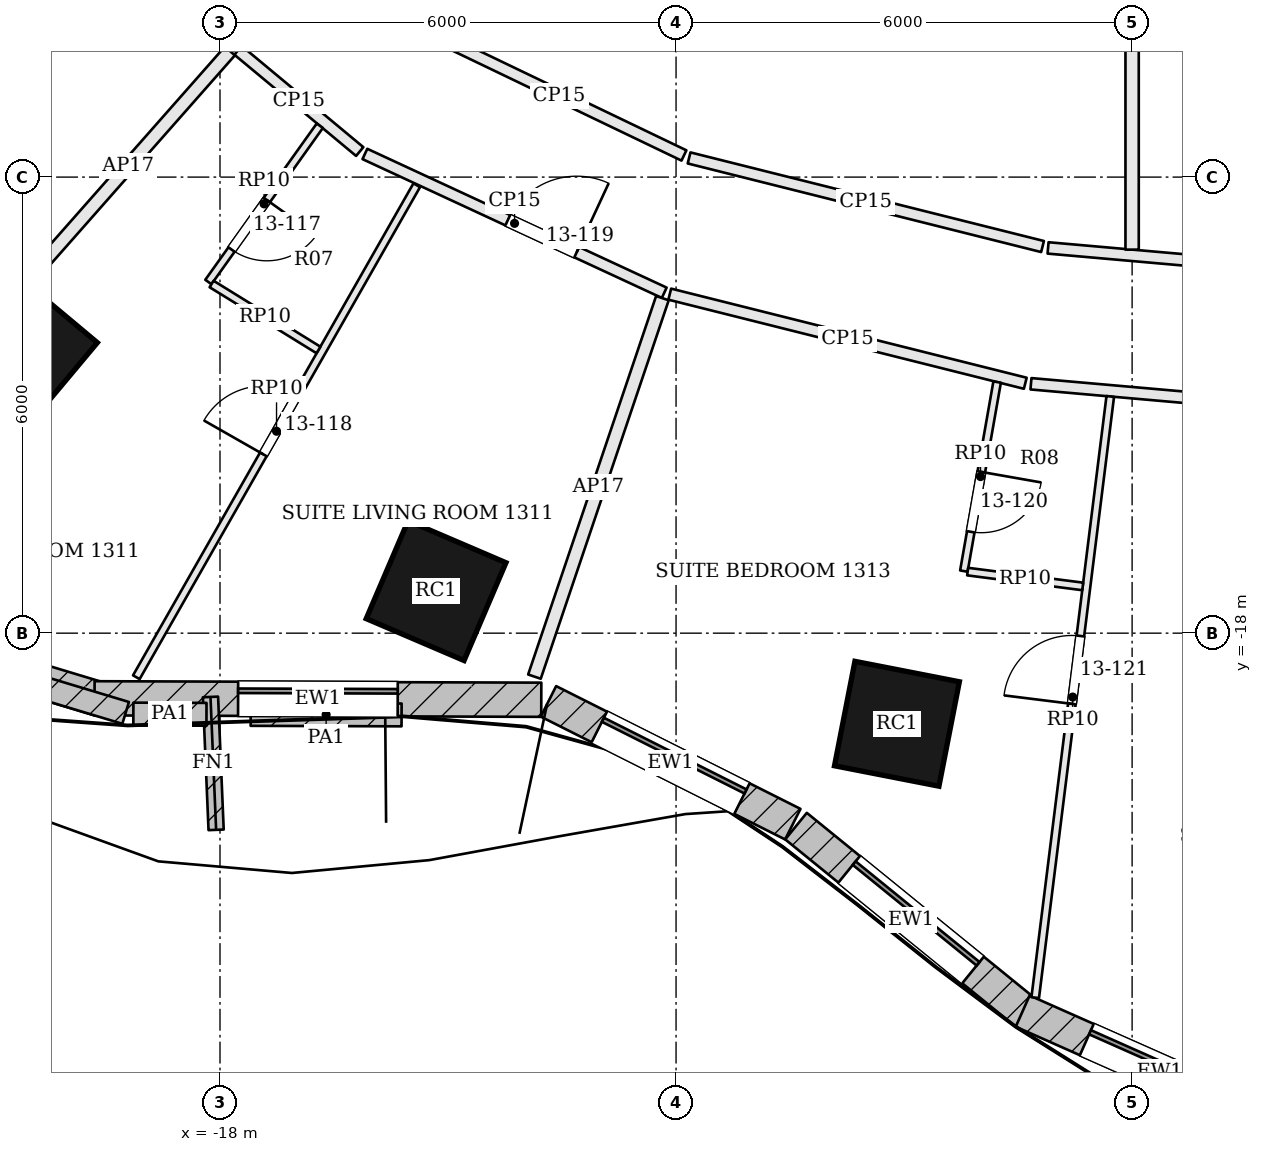
"""IFC4 building model, lengths in metres.
Left out: names, types, materials, properties, quantities, classifications, styles, units other than length and angle.
Written with IfcOpenShell. Run it as: python <this file> out.ifc"""

import sys

from ifc_helpers import new_model, si_unit, direction, frame, frame_2d, origin, origin_2d, place, context, subcontext, project, spatial, rectangle, extrude, element, fill, save


model = new_model("IFC4")
c1 = context("Model", 3, precision=1e-05, world=origin(), true_north=direction((0.0, 1.0)))
c2 = subcontext(c1, "Body", "Model", "MODEL_VIEW")
j1 = project(units=[si_unit("LENGTHUNIT", "METRE"), si_unit("PLANEANGLEUNIT", "RADIAN")], contexts=[c1])
p1 = place(None, origin())
s1 = spatial("IfcSite", under=j1, at=p1, CompositionType="ELEMENT")
p2 = place(p1, origin())
s2 = spatial("IfcBuilding", under=s1, at=p2, CompositionType="ELEMENT")
p3 = place(p2, frame((0.0, 0.0, 62.7)))
s3 = spatial("IfcBuildingStorey", under=s2, at=p3, CompositionType="ELEMENT", Elevation=62.7)
for number, where, z_axis, x_axis in (
    (1, (-20.6, -14.266, 0.0), (0.0, 0.0, 1.0), (0.767, -0.641, 0.0)),
    (2, (-15.157, -17.441, 0.0), (0.0, 0.0, 1.0), (0.919, -0.394, 0.0)),
    (3, (-9.094, -19.192, 0.0), (0.0, 0.0, 1.0), (0.981, -0.192, 0.0)),
):
    element("IfcColumn", number, at=place(p3, frame(where, z_axis=z_axis, x_axis=x_axis)), inside=s3, PredefinedType="COLUMN", context=c2, shape_type="SweptSolid", body=[
        extrude(rectangle(XDim=1.4, YDim=1.4, at=origin_2d()), origin(), (0.0, 0.0, 1.0), 3.6),
    ])
p4 = place(p3, frame((-24.257, -17.456, 0.0), z_axis=(0.0, 0.0, 1.0), x_axis=(0.957268138294, -0.289201852359, 0.0)))
e4 = element("IfcWall", 4, at=p4, inside=s3, PredefinedType="SOLIDWALL", context=c2, shape_type="SweptSolid", body=[
    extrude(rectangle(XDim=4.879, YDim=0.45, at=frame_2d((2.44, 0.0))), origin(), (0.0, 0.0, 1.0), 3.4),
])
p5 = place(p4, frame((1.39, 0.0, 0.9)))
e5 = element("IfcOpeningElement", 5, at=p5, cuts=e4, PredefinedType="OPENING", context=c2, shape_type="SweptSolid", body=[
    extrude(rectangle(XDim=2.1, YDim=2.0, at=frame_2d((1.05, 1.0))), frame((0.0, 0.235, 0.0), z_axis=(0.0, -1.0, 0.0), x_axis=(1.0, 0.0, 0.0)), (0.0, 0.0, 1.0), 0.47),
])
p6 = place(p3, frame((-19.65, -18.857, 0.0), z_axis=(0.0, 0.0, 1.0), x_axis=(0.999994750773, -0.003240127552, 0.0)))
e6 = element("IfcWall", 6, at=p6, inside=s3, PredefinedType="SOLIDWALL", context=c2, shape_type="SweptSolid", body=[
    extrude(rectangle(XDim=5.877, YDim=0.45, at=frame_2d((2.938, 0.0))), origin(), (0.0, 0.0, 1.0), 3.4),
])
p7 = place(p6, frame((1.889, 0.0, 0.9)))
e7 = element("IfcOpeningElement", 7, at=p7, cuts=e6, PredefinedType="OPENING", context=c2, shape_type="SweptSolid", body=[
    extrude(rectangle(XDim=2.1, YDim=2.0, at=frame_2d((1.05, 1.0))), frame((0.0, 0.235, 0.0), z_axis=(0.0, -1.0, 0.0), x_axis=(1.0, 0.0, 0.0)), (0.0, 0.0, 1.0), 0.47),
])
p8 = place(p3, frame((-13.679, -18.897, 0.0), z_axis=(0.0, 0.0, 1.0), x_axis=(0.893502471356, -0.449058274259, 0.0)))
e8 = element("IfcWall", 8, at=p8, inside=s3, PredefinedType="SOLIDWALL", context=c2, shape_type="SweptSolid", body=[
    extrude(rectangle(XDim=3.598, YDim=0.45, at=frame_2d((1.799, 0.0))), origin(), (0.0, 0.0, 1.0), 3.4),
])
p9 = place(p8, frame((0.749, 0.0, 0.9)))
e9 = element("IfcOpeningElement", 9, at=p9, cuts=e8, PredefinedType="OPENING", context=c2, shape_type="SweptSolid", body=[
    extrude(rectangle(XDim=2.1, YDim=2.0, at=frame_2d((1.05, 1.0))), frame((0.0, 0.235, 0.0), z_axis=(0.0, -1.0, 0.0), x_axis=(1.0, 0.0, 0.0)), (0.0, 0.0, 1.0), 0.47),
])
p10 = place(p3, frame((-10.422, -20.539, 0.0), z_axis=(0.0, 0.0, 1.0), x_axis=(0.775999170522, -0.63073392754, 0.0)))
e10 = element("IfcWall", 10, at=p10, inside=s3, PredefinedType="SOLIDWALL", context=c2, shape_type="SweptSolid", body=[
    extrude(rectangle(XDim=3.903, YDim=0.45, at=frame_2d((1.951, 0.0))), origin(), (0.0, 0.0, 1.0), 3.4),
])
p11 = place(p10, frame((0.901, 0.0, 0.9)))
e11 = element("IfcOpeningElement", 11, at=p11, cuts=e10, PredefinedType="OPENING", context=c2, shape_type="SweptSolid", body=[
    extrude(rectangle(XDim=2.1, YDim=2.0, at=frame_2d((1.05, 1.0))), frame((0.0, 0.235, 0.0), z_axis=(0.0, -1.0, 0.0), x_axis=(1.0, 0.0, 0.0)), (0.0, 0.0, 1.0), 0.47),
])
p12 = place(p3, frame((-7.44, -22.972, 0.0), z_axis=(0.0, 0.0, 1.0), x_axis=(0.914114918534, -0.405455195692, 0.0)))
e12 = element("IfcWall", 12, at=p12, inside=s3, PredefinedType="SOLIDWALL", context=c2, shape_type="SweptSolid", body=[
    extrude(rectangle(XDim=3.946, YDim=0.45, at=frame_2d((1.973, 0.0))), origin(), (0.0, 0.0, 1.0), 3.4),
])
p13 = place(p12, frame((0.923, 0.0, 0.9)))
e13 = element("IfcOpeningElement", 13, at=p13, cuts=e12, PredefinedType="OPENING", context=c2, shape_type="SweptSolid", body=[
    extrude(rectangle(XDim=2.1, YDim=2.0, at=frame_2d((1.05, 1.0))), frame((0.0, 0.235, 0.0), z_axis=(0.0, -1.0, 0.0), x_axis=(1.0, 0.0, 0.0)), (0.0, 0.0, 1.0), 0.47),
])
p14 = place(p3, frame((-18.125, -18.839, 0.0), z_axis=(0.0, 0.0, 1.0), x_axis=(0.042274699855, -0.999106025281, 0.0)))
e14 = element("IfcWall", 14, at=p14, inside=s3, PredefinedType="SOLIDWALL", context=c2, shape_type="SweptSolid", body=[
    extrude(rectangle(XDim=1.75, YDim=0.2, at=frame_2d((0.875, 0.0))), origin(), (0.0, 0.0, 1.0), 3.4),
])
p15 = place(p3, frame((-24.128, -17.573, 3.6), z_axis=(0.0, 0.0, 1.0), x_axis=(0.95727702005, -0.289172451806, 0.0)))
e15 = element("IfcWall", 15, at=p15, inside=s3, PredefinedType="PARAPET", context=c2, shape_type="SweptSolid", body=[
    extrude(rectangle(XDim=5.105, YDim=0.3, at=frame_2d((2.553, 0.0))), origin(), (0.0, 0.0, 1.0), 1.1),
])
p16 = place(p3, frame((-19.14, -19.064, 3.6), z_axis=(0.0, 0.0, 1.0), x_axis=(0.999994556719, -0.003299474426, 0.0)))
e16 = element("IfcWall", 16, at=p16, inside=s3, PredefinedType="PARAPET", context=c2, shape_type="SweptSolid", body=[
    extrude(rectangle(XDim=0.962, YDim=0.3, at=frame_2d((0.481, 0.0))), origin(), (0.0, 0.0, 1.0), 1.1),
])
p17 = place(p3, frame((-17.596, -19.069, 3.6), z_axis=(0.0, 0.0, 1.0), x_axis=(0.999994488127, -0.003320198128, 0.0)))
e17 = element("IfcWall", 17, at=p17, inside=s3, PredefinedType="PARAPET", context=c2, shape_type="SweptSolid", body=[
    extrude(rectangle(XDim=1.985, YDim=0.3, at=frame_2d((0.993, 0.0))), origin(), (0.0, 0.0, 1.0), 1.1),
])
p18 = place(p3, frame((-20.545, -13.373, 0.0), z_axis=(0.0, 0.0, 1.0), x_axis=(0.66156772741, 0.74988541928, 0.0)))
e18 = element("IfcWall", 18, at=p18, inside=s3, PredefinedType="PARTITIONING", context=c2, shape_type="SweptSolid", body=[
    extrude(rectangle(XDim=4.044, YDim=0.175, at=frame_2d((2.022, 0.0))), origin(), (0.0, 0.0, 1.0), 2.68),
])
p19 = place(p3, frame((-17.762, -10.333, 0.0), z_axis=(0.0, 0.0, 1.0), x_axis=(0.768864852283, -0.639411322174, 0.0)))
e19 = element("IfcWall", 19, at=p19, inside=s3, PredefinedType="PARTITIONING", context=c2, shape_type="SweptSolid", body=[
    extrude(rectangle(XDim=2.082, YDim=0.15, at=frame_2d((1.041, 0.0))), origin(), (0.0, 0.0, 1.0), 2.68),
])
p20 = place(p3, frame((-16.094, -11.696, 0.0), z_axis=(0.0, 0.0, 1.0), x_axis=(0.907210631987, -0.420676680135, 0.0)))
e20 = element("IfcWall", 20, at=p20, inside=s3, PredefinedType="PARTITIONING", context=c2, shape_type="SweptSolid", body=[
    extrude(rectangle(XDim=4.341, YDim=0.15, at=frame_2d((2.17, 0.0))), origin(), (0.0, 0.0, 1.0), 2.68),
])
p21 = place(p20, frame((2.072, 0.0, 0.0)))
e21 = element("IfcOpeningElement", 21, at=p21, cuts=e20, PredefinedType="OPENING", context=c2, shape_type="SweptSolid", body=[
    extrude(rectangle(XDim=1.0, YDim=2.1, at=frame_2d((0.5, 1.05))), frame((0.0, 0.085, 0.0), z_axis=(0.0, -1.0, 0.0), x_axis=(1.0, 0.0, 0.0)), (0.0, 0.0, 1.0), 0.17),
])
p22 = place(p3, frame((-13.863, -18.572, 0.0), z_axis=(0.0, 0.0, 1.0), x_axis=(0.32028005449, 0.947322905189, 0.0)))
e22 = element("IfcWall", 22, at=p22, inside=s3, PredefinedType="PARTITIONING", context=c2, shape_type="SweptSolid", body=[
    extrude(rectangle(XDim=5.256, YDim=0.175, at=frame_2d((2.628, 0.0))), origin(), (0.0, 0.0, 1.0), 2.68),
])
p23 = place(p3, frame((-12.083, -13.54, 0.0), z_axis=(0.0, 0.0, 1.0), x_axis=(0.969981460173, -0.243178878443, 0.0)))
e23 = element("IfcWall", 23, at=p23, inside=s3, PredefinedType="PARTITIONING", context=c2, shape_type="SweptSolid", body=[
    extrude(rectangle(XDim=4.822, YDim=0.15, at=frame_2d((2.411, 0.0))), origin(), (0.0, 0.0, 1.0), 2.68),
])
p24 = place(p3, frame((-7.331, -14.719, 0.0), z_axis=(0.0, 0.0, 1.0), x_axis=(0.996139466017, -0.087784760882, 0.0)))
e24 = element("IfcWall", 24, at=p24, inside=s3, PredefinedType="PARTITIONING", context=c2, shape_type="SweptSolid", body=[
    extrude(rectangle(XDim=5.162, YDim=0.15, at=frame_2d((2.581, 0.0))), origin(), (0.0, 0.0, 1.0), 2.68),
])
p25 = place(p24, frame((3.622, 0.0, 0.0)))
e25 = element("IfcOpeningElement", 25, at=p25, cuts=e24, PredefinedType="OPENING", context=c2, shape_type="SweptSolid", body=[
    extrude(rectangle(XDim=1.0, YDim=2.1, at=frame_2d((0.5, 1.05))), frame((0.0, 0.085, 0.0), z_axis=(0.0, -1.0, 0.0), x_axis=(1.0, 0.0, 0.0)), (0.0, 0.0, 1.0), 0.17),
])
p26 = place(p3, frame((-2.208, -13.364, 0.0), z_axis=(0.0, 0.0, 1.0), x_axis=(-0.996134962793, 0.087835846335, 0.0)))
e26 = element("IfcWall", 26, at=p26, inside=s3, PredefinedType="PARTITIONING", context=c2, shape_type="SweptSolid", body=[
    extrude(rectangle(XDim=4.917, YDim=0.15, at=frame_2d((2.458, 0.0))), origin(), (0.0, 0.0, 1.0), 2.68),
])
p27 = place(p3, frame((-7.178, -12.914, 0.0), z_axis=(0.0, 0.0, 1.0), x_axis=(-0.969983523639, 0.243170647628, 0.0)))
e27 = element("IfcWall", 27, at=p27, inside=s3, PredefinedType="PARTITIONING", context=c2, shape_type="SweptSolid", body=[
    extrude(rectangle(XDim=4.794, YDim=0.15, at=frame_2d((2.397, 0.0))), origin(), (0.0, 0.0, 1.0), 2.68),
])
p28 = place(p3, frame((-11.896, -11.715, 0.0), z_axis=(0.0, 0.0, 1.0), x_axis=(-0.901466605799, 0.432848655571, 0.0)))
e28 = element("IfcWall", 28, at=p28, inside=s3, PredefinedType="PARTITIONING", context=c2, shape_type="SweptSolid", body=[
    extrude(rectangle(XDim=3.645, YDim=0.15, at=frame_2d((1.822, 0.0))), origin(), (0.0, 0.0, 1.0), 2.68),
])
p29 = place(p3, frame((-26.021, -13.398, 0.0), z_axis=(0.0, 0.0, 1.0), x_axis=(0.791898657623, 0.610652532996, 0.0)))
e29 = element("IfcWall", 29, at=p29, inside=s3, PredefinedType="PARTITIONING", context=c2, shape_type="SweptSolid", body=[
    extrude(rectangle(XDim=8.027, YDim=0.1, at=frame_2d((4.013, 0.0))), origin(), (0.0, 0.0, 1.0), 2.68),
])
p30 = place(p29, frame((3.952, 0.0, 0.0)))
e30 = element("IfcOpeningElement", 30, at=p30, cuts=e29, PredefinedType="OPENING", context=c2, shape_type="SweptSolid", body=[
    extrude(rectangle(XDim=0.9, YDim=2.4, at=frame_2d((0.45, 1.2))), frame((0.0, 0.06, 0.0), z_axis=(0.0, -1.0, 0.0), x_axis=(1.0, 0.0, 0.0)), (0.0, 0.0, 1.0), 0.12),
])
p31 = place(p3, frame((-19.101, -18.58, 0.0), z_axis=(0.0, 0.0, 1.0), x_axis=(0.495157532616, 0.868803210108, 0.0)))
e31 = element("IfcWall", 31, at=p31, inside=s3, PredefinedType="PARTITIONING", context=c2, shape_type="SweptSolid", body=[
    extrude(rectangle(XDim=7.45, YDim=0.1, at=frame_2d((3.725, 0.0))), origin(), (0.0, 0.0, 1.0), 2.68),
])
p32 = place(p31, frame((3.375, 0.0, 0.0)))
e32 = element("IfcOpeningElement", 32, at=p32, cuts=e31, PredefinedType="OPENING", context=c2, shape_type="SweptSolid", body=[
    extrude(rectangle(XDim=0.9, YDim=2.4, at=frame_2d((0.45, 1.2))), frame((0.0, 0.06, 0.0), z_axis=(0.0, -1.0, 0.0), x_axis=(1.0, 0.0, 0.0)), (0.0, 0.0, 1.0), 0.12),
])
p33 = place(p3, frame((-16.687, -11.324, 0.0), z_axis=(0.0, 0.0, 1.0), x_axis=(-0.580533698553, -0.814236221771, 0.0)))
e33 = element("IfcWall", 33, at=p33, inside=s3, PredefinedType="PARTITIONING", context=c2, shape_type="SweptSolid", body=[
    extrude(rectangle(XDim=2.525, YDim=0.1, at=frame_2d((1.262, 0.0))), origin(), (0.0, 0.0, 1.0), 2.68),
])
p34 = place(p33, frame((1.2, 0.0, 0.0)))
e34 = element("IfcOpeningElement", 34, at=p34, cuts=e33, PredefinedType="OPENING", context=c2, shape_type="SweptSolid", body=[
    extrude(rectangle(XDim=0.8, YDim=2.1, at=frame_2d((0.4, 1.05))), frame((0.0, 0.06, 0.0), z_axis=(0.0, -1.0, 0.0), x_axis=(1.0, 0.0, 0.0)), (0.0, 0.0, 1.0), 0.12),
])
p35 = place(p3, frame((-18.11, -13.406, 0.0), z_axis=(0.0, 0.0, 1.0), x_axis=(0.850932033391, -0.525275808075, 0.0)))
e35 = element("IfcWall", 35, at=p35, inside=s3, PredefinedType="PARTITIONING", context=c2, shape_type="SweptSolid", body=[
    extrude(rectangle(XDim=1.652, YDim=0.1, at=frame_2d((0.826, 0.0))), origin(), (0.0, 0.0, 1.0), 2.68),
])
p36 = place(p3, frame((-7.275, -22.795, 0.0), z_axis=(0.0, 0.0, 1.0), x_axis=(0.123872623133, 0.992298127197, 0.0)))
e36 = element("IfcWall", 36, at=p36, inside=s3, PredefinedType="PARTITIONING", context=c2, shape_type="SweptSolid", body=[
    extrude(rectangle(XDim=7.97, YDim=0.1, at=frame_2d((3.985, 0.0))), origin(), (0.0, 0.0, 1.0), 2.68),
])
p37 = place(p36, frame((3.895, 0.0, 0.0)))
e37 = element("IfcOpeningElement", 37, at=p37, cuts=e36, PredefinedType="OPENING", context=c2, shape_type="SweptSolid", body=[
    extrude(rectangle(XDim=0.9, YDim=2.4, at=frame_2d((0.45, 1.2))), frame((0.0, 0.06, 0.0), z_axis=(0.0, -1.0, 0.0), x_axis=(1.0, 0.0, 0.0)), (0.0, 0.0, 1.0), 0.12),
])
p38 = place(p3, frame((-7.776, -14.697, 0.0), z_axis=(0.0, 0.0, 1.0), x_axis=(-0.173360606745, -0.984858416235, 0.0)))
e38 = element("IfcWall", 38, at=p38, inside=s3, PredefinedType="PARTITIONING", context=c2, shape_type="SweptSolid", body=[
    extrude(rectangle(XDim=2.525, YDim=0.1, at=frame_2d((1.263, 0.0))), origin(), (0.0, 0.0, 1.0), 2.68),
])
p39 = place(p38, frame((1.2, 0.0, 0.0)))
e39 = element("IfcOpeningElement", 39, at=p39, cuts=e38, PredefinedType="OPENING", context=c2, shape_type="SweptSolid", body=[
    extrude(rectangle(XDim=0.8, YDim=2.1, at=frame_2d((0.4, 1.05))), frame((0.0, 0.06, 0.0), z_axis=(0.0, -1.0, 0.0), x_axis=(1.0, 0.0, 0.0)), (0.0, 0.0, 1.0), 0.12),
])
p40 = place(p3, frame((-8.164, -17.19, 0.0), z_axis=(0.0, 0.0, 1.0), x_axis=(0.991762801698, -0.128088036788, 0.0)))
e40 = element("IfcWall", 40, at=p40, inside=s3, PredefinedType="PARTITIONING", context=c2, shape_type="SweptSolid", body=[
    extrude(rectangle(XDim=1.527, YDim=0.1, at=frame_2d((0.763, 0.0))), origin(), (0.0, 0.0, 1.0), 2.68),
])
p41 = place(p3, frame((-6.0, -12.954, 0.0), z_axis=(0.0, 0.0, 1.0), x_axis=(0.0, 1.0, 0.0)))
e41 = element("IfcWall", 41, at=p41, inside=s3, PredefinedType="PARTITIONING", context=c2, shape_type="SweptSolid", body=[
    extrude(rectangle(XDim=8.079, YDim=0.175, at=frame_2d((4.04, 0.0))), origin(), (0.0, 0.0, 1.0), 2.68),
])
p42 = place(p7, origin())
e42 = element("IfcWindow", 42, at=p42, inside=s3, PartitioningType="SINGLE_PANEL", PredefinedType="WINDOW", context=c2, shape_type="SweptSolid", body=[
    extrude(rectangle(XDim=2.1, YDim=2.0, at=frame_2d((1.05, 1.0))), frame((0.0, 0.135, 0.0), z_axis=(0.0, -1.0, 0.0), x_axis=(1.0, 0.0, 0.0)), (0.0, 0.0, 1.0), 0.06),
])
fill(e7, e42)
p43 = place(p9, origin())
e43 = element("IfcWindow", 43, at=p43, inside=s3, PartitioningType="SINGLE_PANEL", PredefinedType="WINDOW", context=c2, shape_type="SweptSolid", body=[
    extrude(rectangle(XDim=2.1, YDim=2.0, at=frame_2d((1.05, 1.0))), frame((0.0, 0.135, 0.0), z_axis=(0.0, -1.0, 0.0), x_axis=(1.0, 0.0, 0.0)), (0.0, 0.0, 1.0), 0.06),
])
fill(e9, e43)
p44 = place(p11, origin())
e44 = element("IfcWindow", 44, at=p44, inside=s3, PartitioningType="SINGLE_PANEL", PredefinedType="WINDOW", context=c2, shape_type="SweptSolid", body=[
    extrude(rectangle(XDim=2.1, YDim=2.0, at=frame_2d((1.05, 1.0))), frame((0.0, 0.135, 0.0), z_axis=(0.0, -1.0, 0.0), x_axis=(1.0, 0.0, 0.0)), (0.0, 0.0, 1.0), 0.06),
])
fill(e11, e44)
p45 = place(p13, origin())
e45 = element("IfcWindow", 45, at=p45, inside=s3, PartitioningType="SINGLE_PANEL", PredefinedType="WINDOW", context=c2, shape_type="SweptSolid", body=[
    extrude(rectangle(XDim=2.1, YDim=2.0, at=frame_2d((1.05, 1.0))), frame((0.0, 0.135, 0.0), z_axis=(0.0, -1.0, 0.0), x_axis=(1.0, 0.0, 0.0)), (0.0, 0.0, 1.0), 0.06),
])
fill(e13, e45)
p46 = place(p34, origin())
e46 = element("IfcDoor", 46, at=p46, inside=s3, OperationType="SINGLE_SWING_LEFT", PredefinedType="DOOR", context=c2, shape_type="SweptSolid", body=[
    extrude(rectangle(XDim=0.8, YDim=2.1, at=frame_2d((0.4, 1.05))), frame((0.0, 0.025, 0.0), z_axis=(0.0, -1.0, 0.0), x_axis=(1.0, 0.0, 0.0)), (0.0, 0.0, 1.0), 0.05),
])
fill(e34, e46)
p47 = place(p32, origin())
e47 = element("IfcDoor", 47, at=p47, inside=s3, OperationType="SINGLE_SWING_LEFT", PredefinedType="DOOR", context=c2, shape_type="SweptSolid", body=[
    extrude(rectangle(XDim=0.9, YDim=2.4, at=frame_2d((0.45, 1.2))), frame((0.0, 0.025, 0.0), z_axis=(0.0, -1.0, 0.0), x_axis=(1.0, 0.0, 0.0)), (0.0, 0.0, 1.0), 0.05),
])
fill(e32, e47)
p48 = place(p21, origin())
e48 = element("IfcDoor", 48, at=p48, inside=s3, OperationType="SINGLE_SWING_RIGHT", PredefinedType="DOOR", context=c2, shape_type="SweptSolid", body=[
    extrude(rectangle(XDim=1.0, YDim=2.1, at=frame_2d((0.5, 1.05))), frame((0.0, 0.025, 0.0), z_axis=(0.0, -1.0, 0.0), x_axis=(1.0, 0.0, 0.0)), (0.0, 0.0, 1.0), 0.05),
])
fill(e21, e48)
p49 = place(p39, origin())
e49 = element("IfcDoor", 49, at=p49, inside=s3, OperationType="SINGLE_SWING_LEFT", PredefinedType="DOOR", context=c2, shape_type="SweptSolid", body=[
    extrude(rectangle(XDim=0.8, YDim=2.1, at=frame_2d((0.4, 1.05))), frame((0.0, 0.025, 0.0), z_axis=(0.0, -1.0, 0.0), x_axis=(1.0, 0.0, 0.0)), (0.0, 0.0, 1.0), 0.05),
])
fill(e39, e49)
p50 = place(p37, origin())
e50 = element("IfcDoor", 50, at=p50, inside=s3, OperationType="SINGLE_SWING_LEFT", PredefinedType="DOOR", context=c2, shape_type="SweptSolid", body=[
    extrude(rectangle(XDim=0.9, YDim=2.4, at=frame_2d((0.45, 1.2))), frame((0.0, 0.025, 0.0), z_axis=(0.0, -1.0, 0.0), x_axis=(1.0, 0.0, 0.0)), (0.0, 0.0, 1.0), 0.05),
])
fill(e37, e50)
save(model, sys.argv[1])
